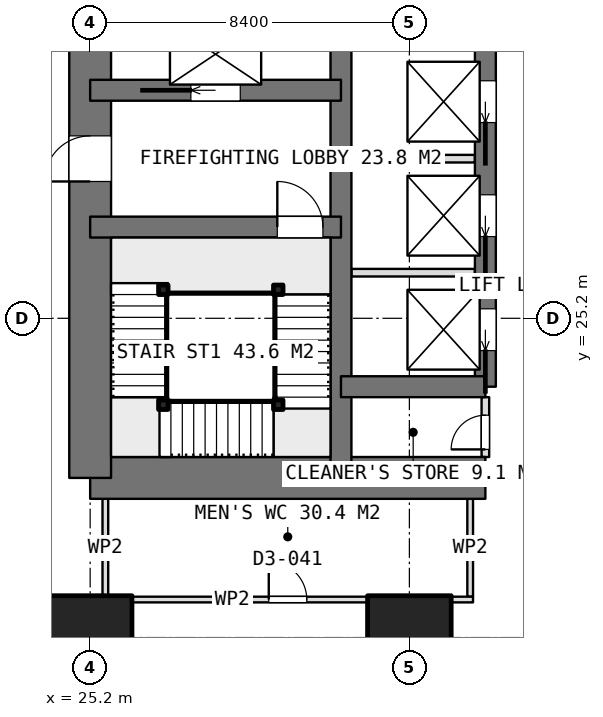
"""IFC4 building model, lengths in metres.
Left out: names, types, materials, properties, quantities, classifications, styles, units other than length and angle.
Written with IfcOpenShell. Run it as: python <this file> out.ifc"""

import sys

from ifc_helpers import new_model, si_unit, direction, frame, frame_2d, origin, origin_2d, place, context, subcontext, project, spatial, rectangle, extrude, element, fill, save


model = new_model("IFC4")
c1 = context("Model", 3, precision=1e-05, world=origin(), true_north=direction((0.0, 1.0)))
c2 = subcontext(c1, "Body", "Model", "MODEL_VIEW")
j1 = project(units=[si_unit("LENGTHUNIT", "METRE"), si_unit("PLANEANGLEUNIT", "RADIAN")], contexts=[c1])
p1 = place(None, origin())
s1 = spatial("IfcSite", under=j1, at=p1, CompositionType="ELEMENT")
p2 = place(p1, origin())
s2 = spatial("IfcBuilding", under=s1, at=p2, CompositionType="ELEMENT")
p3 = place(p2, frame((0.0, 0.0, 36.65)))
s3 = spatial("IfcBuildingStorey", under=s2, at=p3, CompositionType="ELEMENT", Elevation=36.65)
p4 = place(p3, frame((25.2, 21.0, 0.0), z_axis=(0.0, 0.0, 1.0), x_axis=(1.0, 0.0, 0.0)))
e1 = element("IfcWall", 1, at=p4, inside=s3, PredefinedType="SHEAR", context=c2, shape_type="SweptSolid", body=[
    extrude(rectangle(XDim=10.4, YDim=1.1, at=frame_2d((5.2, 0.0))), origin(), (0.0, 0.0, 1.0), 3.75),
])
p5 = place(p3, frame((25.2, 21.0, 0.0), z_axis=(0.0, 0.0, 1.0), x_axis=(0.0, 1.0, 0.0)))
e2 = element("IfcWall", 2, at=p5, inside=s3, PredefinedType="SHEAR", context=c2, shape_type="SweptSolid", body=[
    extrude(rectangle(XDim=25.2, YDim=1.1, at=frame_2d((12.6, 0.0))), origin(), (0.0, 0.0, 1.0), 3.75),
])
p6 = place(p5, frame((7.8, 0.0, 0.0)))
e3 = element("IfcOpeningElement", 3, at=p6, cuts=e2, PredefinedType="OPENING", context=c2, shape_type="SweptSolid", body=[
    extrude(rectangle(XDim=1.2, YDim=2.1, at=frame_2d((0.6, 1.05))), frame((0.0, 0.56, 0.0), z_axis=(0.0, -1.0, 0.0), x_axis=(1.0, 0.0, 0.0)), (0.0, 0.0, 1.0), 1.12),
])
p7 = place(p5, frame((14.25, 0.0, 0.0)))
e4 = element("IfcOpeningElement", 4, at=p7, cuts=e2, PredefinedType="OPENING", context=c2, shape_type="SweptSolid", body=[
    extrude(rectangle(XDim=0.9, YDim=2.1, at=frame_2d((0.45, 1.05))), frame((0.0, 0.56, 0.0), z_axis=(0.0, -1.0, 0.0), x_axis=(1.0, 0.0, 0.0)), (0.0, 0.0, 1.0), 1.12),
])
p8 = place(p5, frame((16.85, 0.0, 0.0)))
e5 = element("IfcOpeningElement", 5, at=p8, cuts=e2, PredefinedType="OPENING", context=c2, shape_type="SweptSolid", body=[
    extrude(rectangle(XDim=0.9, YDim=2.1, at=frame_2d((0.45, 1.05))), frame((0.0, 0.56, 0.0), z_axis=(0.0, -1.0, 0.0), x_axis=(1.0, 0.0, 0.0)), (0.0, 0.0, 1.0), 1.12),
])
p9 = place(p5, frame((19.075, 0.0, 0.0)))
e6 = element("IfcOpeningElement", 6, at=p9, cuts=e2, PredefinedType="OPENING", context=c2, shape_type="SweptSolid", body=[
    extrude(rectangle(XDim=1.2, YDim=2.1, at=frame_2d((0.6, 1.05))), frame((0.0, 0.56, 0.0), z_axis=(0.0, -1.0, 0.0), x_axis=(1.0, 0.0, 0.0)), (0.0, 0.0, 1.0), 1.12),
])
p10 = place(p3, frame((31.8, 21.0, 0.0), z_axis=(0.0, 0.0, 1.0), x_axis=(0.0, 1.0, 0.0)))
e7 = element("IfcWall", 7, at=p10, inside=s3, PredefinedType="SHEAR", context=c2, shape_type="SweptSolid", body=[
    extrude(rectangle(XDim=25.2, YDim=0.55, at=frame_2d((12.6, 0.0))), origin(), (0.0, 0.0, 1.0), 3.75),
])
p11 = place(p3, frame((35.6, 23.4, 0.0), z_axis=(0.0, 0.0, 1.0), x_axis=(0.0, 1.0, 0.0)))
e8 = element("IfcWall", 8, at=p11, inside=s3, PredefinedType="SHEAR", context=c2, shape_type="SweptSolid", body=[
    extrude(rectangle(XDim=18.0, YDim=0.55, at=frame_2d((9.0, 0.0))), origin(), (0.0, 0.0, 1.0), 3.75),
])
p12 = place(p11, frame((0.95, 0.0, 0.0)))
e9 = element("IfcOpeningElement", 9, at=p12, cuts=e8, PredefinedType="OPENING", context=c2, shape_type="SweptSolid", body=[
    extrude(rectangle(XDim=1.1, YDim=2.1, at=frame_2d((0.55, 1.05))), frame((0.0, 0.285, 0.0), z_axis=(0.0, -1.0, 0.0), x_axis=(1.0, 0.0, 0.0)), (0.0, 0.0, 1.0), 0.57),
])
p13 = place(p11, frame((3.95, 0.0, 0.0)))
e10 = element("IfcOpeningElement", 10, at=p13, cuts=e8, PredefinedType="OPENING", context=c2, shape_type="SweptSolid", body=[
    extrude(rectangle(XDim=1.1, YDim=2.1, at=frame_2d((0.55, 1.05))), frame((0.0, 0.285, 0.0), z_axis=(0.0, -1.0, 0.0), x_axis=(1.0, 0.0, 0.0)), (0.0, 0.0, 1.0), 0.57),
])
p14 = place(p11, frame((6.95, 0.0, 0.0)))
e11 = element("IfcOpeningElement", 11, at=p14, cuts=e8, PredefinedType="OPENING", context=c2, shape_type="SweptSolid", body=[
    extrude(rectangle(XDim=1.1, YDim=2.1, at=frame_2d((0.55, 1.05))), frame((0.0, 0.285, 0.0), z_axis=(0.0, -1.0, 0.0), x_axis=(1.0, 0.0, 0.0)), (0.0, 0.0, 1.0), 0.57),
])
p15 = place(p11, frame((9.95, 0.0, 0.0)))
e12 = element("IfcOpeningElement", 12, at=p15, cuts=e8, PredefinedType="OPENING", context=c2, shape_type="SweptSolid", body=[
    extrude(rectangle(XDim=1.1, YDim=2.1, at=frame_2d((0.55, 1.05))), frame((0.0, 0.285, 0.0), z_axis=(0.0, -1.0, 0.0), x_axis=(1.0, 0.0, 0.0)), (0.0, 0.0, 1.0), 0.57),
])
p16 = place(p11, frame((12.95, 0.0, 0.0)))
e13 = element("IfcOpeningElement", 13, at=p16, cuts=e8, PredefinedType="OPENING", context=c2, shape_type="SweptSolid", body=[
    extrude(rectangle(XDim=1.1, YDim=2.1, at=frame_2d((0.55, 1.05))), frame((0.0, 0.285, 0.0), z_axis=(0.0, -1.0, 0.0), x_axis=(1.0, 0.0, 0.0)), (0.0, 0.0, 1.0), 0.57),
])
p17 = place(p11, frame((15.95, 0.0, 0.0)))
e14 = element("IfcOpeningElement", 14, at=p17, cuts=e8, PredefinedType="OPENING", context=c2, shape_type="SweptSolid", body=[
    extrude(rectangle(XDim=1.1, YDim=2.1, at=frame_2d((0.55, 1.05))), frame((0.0, 0.285, 0.0), z_axis=(0.0, -1.0, 0.0), x_axis=(1.0, 0.0, 0.0)), (0.0, 0.0, 1.0), 0.57),
])
p18 = place(p3, frame((31.8, 23.4, 0.0), z_axis=(0.0, 0.0, 1.0), x_axis=(1.0, 0.0, 0.0)))
e15 = element("IfcWall", 15, at=p18, inside=s3, PredefinedType="SHEAR", context=c2, shape_type="SweptSolid", body=[
    extrude(rectangle(XDim=3.8, YDim=0.55, at=frame_2d((1.9, 0.0))), origin(), (0.0, 0.0, 1.0), 3.75),
])
p19 = place(p3, frame((25.2, 27.6, 0.0), z_axis=(0.0, 0.0, 1.0), x_axis=(1.0, 0.0, 0.0)))
e16 = element("IfcWall", 16, at=p19, inside=s3, PredefinedType="SHEAR", context=c2, shape_type="SweptSolid", body=[
    extrude(rectangle(XDim=6.6, YDim=0.55, at=frame_2d((3.3, 0.0))), origin(), (0.0, 0.0, 1.0), 3.75),
])
p20 = place(p19, frame((4.925, 0.0, 0.0)))
e17 = element("IfcOpeningElement", 17, at=p20, cuts=e16, PredefinedType="OPENING", context=c2, shape_type="SweptSolid", body=[
    extrude(rectangle(XDim=1.2, YDim=2.1, at=frame_2d((0.6, 1.05))), frame((0.0, 0.285, 0.0), z_axis=(0.0, -1.0, 0.0), x_axis=(1.0, 0.0, 0.0)), (0.0, 0.0, 1.0), 0.57),
])
p21 = place(p3, frame((25.2, 31.2, 0.0), z_axis=(0.0, 0.0, 1.0), x_axis=(1.0, 0.0, 0.0)))
e18 = element("IfcWall", 18, at=p21, inside=s3, PredefinedType="SHEAR", context=c2, shape_type="SweptSolid", body=[
    extrude(rectangle(XDim=6.6, YDim=0.55, at=frame_2d((3.3, 0.0))), origin(), (0.0, 0.0, 1.0), 3.75),
])
p22 = place(p21, frame((2.65, 0.0, 0.0)))
e19 = element("IfcOpeningElement", 19, at=p22, cuts=e18, PredefinedType="OPENING", context=c2, shape_type="SweptSolid", body=[
    extrude(rectangle(XDim=1.3, YDim=2.1, at=frame_2d((0.65, 1.05))), frame((0.0, 0.285, 0.0), z_axis=(0.0, -1.0, 0.0), x_axis=(1.0, 0.0, 0.0)), (0.0, 0.0, 1.0), 0.57),
])
for number, where, z_axis, x_axis in (
    (20, (25.2, 16.8, 0.0), (0.0, 0.0, 1.0), (1.0, 0.0, 0.0)),
    (21, (33.6, 16.8, 0.0), (0.0, 0.0, 1.0), (1.0, 0.0, 0.0)),
):
    element("IfcColumn", number, at=place(p3, frame(where, z_axis=z_axis, x_axis=x_axis)), inside=s3, PredefinedType="COLUMN", context=c2, shape_type="SweptSolid", body=[
        extrude(rectangle(XDim=2.2, YDim=2.2, at=origin_2d()), origin(), (0.0, 0.0, 1.0), 3.75),
    ])
for number, where, z_axis, x_axis in (
    (22, (32.075, 26.4, 0.0), (0.0, 0.0, 1.0), (1.0, 0.0, 0.0)),
    (23, (32.075, 29.4, 0.0), (0.0, 0.0, 1.0), (1.0, 0.0, 0.0)),
):
    element("IfcWall", number, at=place(p3, frame(where, z_axis=z_axis, x_axis=x_axis)), inside=s3, PredefinedType="PARTITIONING", context=c2, shape_type="SweptSolid", body=[
        extrude(rectangle(XDim=3.25, YDim=0.2, at=frame_2d((1.625, 0.0))), origin(), (0.0, 0.0, 1.0), 3.5),
    ])
p23 = place(p3, frame((35.6, 21.55, 0.0), z_axis=(0.0, 0.0, 1.0), x_axis=(0.0, 1.0, 0.0)))
e24 = element("IfcWall", 24, at=p23, inside=s3, PredefinedType="PARTITIONING", context=c2, shape_type="SweptSolid", body=[
    extrude(rectangle(XDim=1.575, YDim=0.2, at=frame_2d((0.788, 0.0))), origin(), (0.0, 0.0, 1.0), 3.5),
])
p24 = place(p23, frame((0.2, 0.0, 0.0)))
e25 = element("IfcOpeningElement", 25, at=p24, cuts=e24, PredefinedType="OPENING", context=c2, shape_type="SweptSolid", body=[
    extrude(rectangle(XDim=0.9, YDim=2.1, at=frame_2d((0.45, 1.05))), frame((0.0, 0.11, 0.0), z_axis=(0.0, -1.0, 0.0), x_axis=(1.0, 0.0, 0.0)), (0.0, 0.0, 1.0), 0.22),
])
p25 = place(p3, frame((25.525, 17.8, 0.0), z_axis=(0.0, 0.0, 1.0), x_axis=(1.0, 0.0, 0.0)))
e26 = element("IfcWall", 26, at=p25, inside=s3, PredefinedType="PARTITIONING", context=c2, shape_type="SweptSolid", body=[
    extrude(rectangle(XDim=9.75, YDim=0.15, at=frame_2d((4.875, 0.0))), origin(), (0.0, 0.0, 1.0), 3.5),
])
p26 = place(p25, frame((4.375, 0.0, 0.0)))
e27 = element("IfcOpeningElement", 27, at=p26, cuts=e26, PredefinedType="OPENING", context=c2, shape_type="SweptSolid", body=[
    extrude(rectangle(XDim=1.0, YDim=2.1, at=frame_2d((0.5, 1.05))), frame((0.0, 0.085, 0.0), z_axis=(0.0, -1.0, 0.0), x_axis=(1.0, 0.0, 0.0)), (0.0, 0.0, 1.0), 0.17),
])
for number, where, z_axis, x_axis in (
    (28, (25.6, 17.875, 0.0), (0.0, 0.0, 1.0), (0.0, 1.0, 0.0)),
    (29, (35.2, 17.875, 0.0), (0.0, 0.0, 1.0), (0.0, 1.0, 0.0)),
):
    element("IfcWall", number, at=place(p3, frame(where, z_axis=z_axis, x_axis=x_axis)), inside=s3, PredefinedType="PARTITIONING", context=c2, shape_type="SweptSolid", body=[
        extrude(rectangle(XDim=2.575, YDim=0.15, at=frame_2d((1.288, 0.0))), origin(), (0.0, 0.0, 1.0), 3.5),
    ])
for number, where, z_axis, x_axis in (
    (30, (30.15, 25.95, 0.0), (0.0, 0.0, 1.0), (1.0, 0.0, 0.0)),
    (31, (30.15, 22.925, 0.0), (0.0, 0.0, 1.0), (1.0, 0.0, 0.0)),
    (32, (27.125, 22.925, 0.0), (0.0, 0.0, 1.0), (1.0, 0.0, 0.0)),
    (33, (27.125, 25.95, 0.0), (0.0, 0.0, 1.0), (1.0, 0.0, 0.0)),
):
    element("IfcColumn", number, at=place(p3, frame(where, z_axis=z_axis, x_axis=x_axis)), inside=s3, PredefinedType="COLUMN", context=c2, shape_type="SweptSolid", body=[
        extrude(rectangle(XDim=0.25, YDim=0.25, at=origin_2d()), origin(), (0.0, 0.0, 1.0), 3.75),
    ])
p27 = place(p6, origin())
e34 = element("IfcDoor", 34, at=p27, inside=s3, OperationType="SINGLE_SWING_LEFT", PredefinedType="DOOR", context=c2, shape_type="SweptSolid", body=[
    extrude(rectangle(XDim=1.2, YDim=2.1, at=frame_2d((0.6, 1.05))), frame((0.0, 0.025, 0.0), z_axis=(0.0, -1.0, 0.0), x_axis=(1.0, 0.0, 0.0)), (0.0, 0.0, 1.0), 0.05),
])
fill(e3, e34)
p28 = place(p24, origin())
e35 = element("IfcDoor", 35, at=p28, inside=s3, OperationType="SINGLE_SWING_LEFT", PredefinedType="DOOR", context=c2, shape_type="SweptSolid", body=[
    extrude(rectangle(XDim=0.9, YDim=2.1, at=frame_2d((0.45, 1.05))), frame((0.0, 0.025, 0.0), z_axis=(0.0, -1.0, 0.0), x_axis=(1.0, 0.0, 0.0)), (0.0, 0.0, 1.0), 0.05),
])
fill(e25, e35)
p29 = place(p12, origin())
e36 = element("IfcDoor", 36, at=p29, inside=s3, OperationType="SLIDING_TO_LEFT", PredefinedType="USERDEFINED", context=c2, shape_type="SweptSolid", body=[
    extrude(rectangle(XDim=1.1, YDim=2.1, at=frame_2d((0.55, 1.05))), frame((0.0, 0.025, 0.0), z_axis=(0.0, -1.0, 0.0), x_axis=(1.0, 0.0, 0.0)), (0.0, 0.0, 1.0), 0.05),
])
fill(e9, e36)
p30 = place(p13, origin())
e37 = element("IfcDoor", 37, at=p30, inside=s3, OperationType="SLIDING_TO_LEFT", PredefinedType="USERDEFINED", context=c2, shape_type="SweptSolid", body=[
    extrude(rectangle(XDim=1.1, YDim=2.1, at=frame_2d((0.55, 1.05))), frame((0.0, 0.025, 0.0), z_axis=(0.0, -1.0, 0.0), x_axis=(1.0, 0.0, 0.0)), (0.0, 0.0, 1.0), 0.05),
])
fill(e10, e37)
p31 = place(p14, origin())
e38 = element("IfcDoor", 38, at=p31, inside=s3, OperationType="SLIDING_TO_LEFT", PredefinedType="USERDEFINED", context=c2, shape_type="SweptSolid", body=[
    extrude(rectangle(XDim=1.1, YDim=2.1, at=frame_2d((0.55, 1.05))), frame((0.0, 0.025, 0.0), z_axis=(0.0, -1.0, 0.0), x_axis=(1.0, 0.0, 0.0)), (0.0, 0.0, 1.0), 0.05),
])
fill(e11, e38)
p32 = place(p22, origin())
e39 = element("IfcDoor", 39, at=p32, inside=s3, OperationType="SLIDING_TO_LEFT", PredefinedType="USERDEFINED", context=c2, shape_type="SweptSolid", body=[
    extrude(rectangle(XDim=1.3, YDim=2.1, at=frame_2d((0.65, 1.05))), frame((0.0, 0.025, 0.0), z_axis=(0.0, -1.0, 0.0), x_axis=(1.0, 0.0, 0.0)), (0.0, 0.0, 1.0), 0.05),
])
fill(e19, e39)
p33 = place(p26, origin())
e40 = element("IfcDoor", 40, at=p33, inside=s3, OperationType="SINGLE_SWING_LEFT", PredefinedType="DOOR", context=c2, shape_type="SweptSolid", body=[
    extrude(rectangle(XDim=1.0, YDim=2.1, at=frame_2d((0.5, 1.05))), frame((0.0, 0.025, 0.0), z_axis=(0.0, -1.0, 0.0), x_axis=(1.0, 0.0, 0.0)), (0.0, 0.0, 1.0), 0.05),
])
fill(e27, e40)
p34 = place(p20, origin())
e41 = element("IfcDoor", 41, at=p34, inside=s3, OperationType="SINGLE_SWING_RIGHT", PredefinedType="DOOR", context=c2, shape_type="SweptSolid", body=[
    extrude(rectangle(XDim=1.2, YDim=2.1, at=frame_2d((0.6, 1.05))), frame((0.0, 0.025, 0.0), z_axis=(0.0, -1.0, 0.0), x_axis=(1.0, 0.0, 0.0)), (0.0, 0.0, 1.0), 0.05),
])
fill(e17, e41)
save(model, sys.argv[1])
